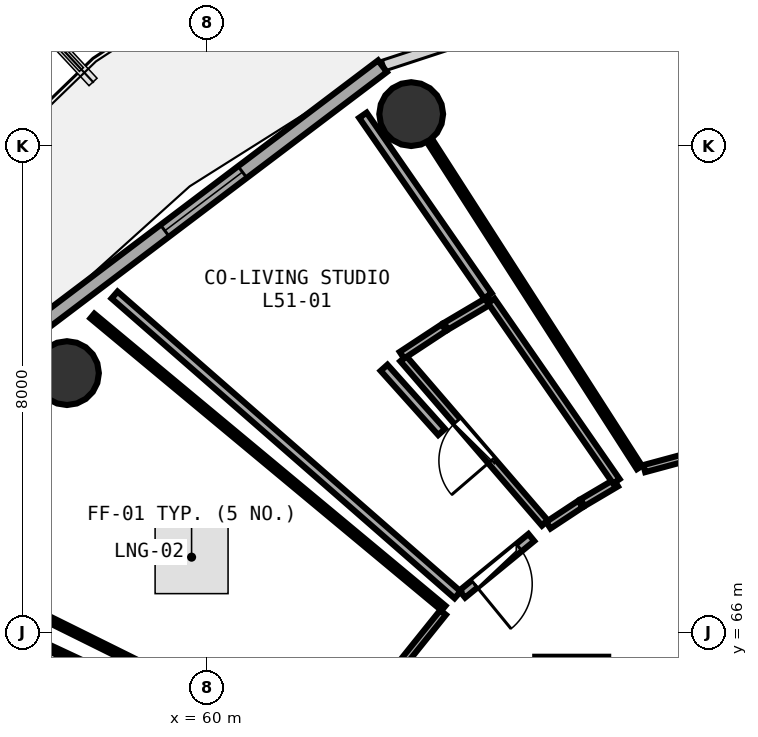
"""IFC4 building model, lengths in metres.
Left out: names, types, materials, properties, quantities, classifications, styles, units other than length and angle.
Written with IfcOpenShell. Run it as: python <this file> out.ifc"""

import sys

from ifc_helpers import new_model, si_unit, direction, frame, frame_2d, origin, origin_2d, place, context, subcontext, project, spatial, rectangle, circle, extrude, element, fill, save


model = new_model("IFC4")
c1 = context("Model", 3, precision=1e-05, world=origin(), true_north=direction((0.0, 1.0)))
c2 = subcontext(c1, "Body", "Model", "MODEL_VIEW")
j1 = project(units=[si_unit("LENGTHUNIT", "METRE"), si_unit("PLANEANGLEUNIT", "RADIAN")], contexts=[c1])
p1 = place(None, origin())
s1 = spatial("IfcSite", under=j1, at=p1, CompositionType="ELEMENT")
p2 = place(p1, origin())
s2 = spatial("IfcBuilding", under=s1, at=p2, CompositionType="ELEMENT")
p3 = place(p2, frame((0.0, 0.0, 200.7)))
s3 = spatial("IfcBuildingStorey", under=s2, at=p3, CompositionType="ELEMENT", Elevation=200.7)
p4 = place(p3, frame((66.0, 65.0, 0.0), z_axis=(0.0, 0.0, 1.0), x_axis=(1.0, 0.0, 0.0)))
e1 = element("IfcColumn", 1, at=p4, inside=s3, PredefinedType="PILASTER", context=c2, shape_type="SweptSolid", body=[
    extrude(rectangle(XDim=1.2, YDim=1.2, at=origin_2d()), origin(), (0.0, 0.0, 1.0), 3.75),
])
for number, where, z_axis, x_axis in (
    (2, (63.36, 74.524, 0.0), (0.0, 0.0, 1.0), (1.0, 0.0, 0.0)),
    (3, (57.698, 70.264, 0.0), (0.0, 0.0, 1.0), (1.0, 0.0, 0.0)),
):
    element("IfcColumn", number, at=place(p3, frame(where, z_axis=z_axis, x_axis=x_axis)), inside=s3, PredefinedType="COLUMN", context=c2, shape_type="SweptSolid", body=[
        extrude(circle(Radius=0.525, at=origin_2d()), origin(), (0.0, 0.0, 1.0), 3.75),
    ])
p5 = place(p3, frame((62.888, 75.312, 0.0), z_axis=(0.0, 0.0, 1.0), x_axis=(-0.797701674595, -0.603052268338, 0.0)))
e4 = element("IfcWall", 4, at=p5, inside=s3, PredefinedType="SOLIDWALL", context=c2, shape_type="SweptSolid", body=[
    extrude(rectangle(XDim=7.374, YDim=0.24, at=frame_2d((3.687, 0.0))), origin(), (0.0, 0.0, 1.0), 3.475),
])
p6 = place(p5, frame((2.887, 0.0, 0.85)))
e5 = element("IfcOpeningElement", 5, at=p6, cuts=e4, PredefinedType="OPENING", context=c2, shape_type="SweptSolid", body=[
    extrude(rectangle(XDim=1.6, YDim=1.45, at=frame_2d((0.8, 0.725))), frame((0.0, 0.13, 0.0), z_axis=(0.0, -1.0, 0.0), x_axis=(1.0, 0.0, 0.0)), (0.0, 0.0, 1.0), 0.26),
])
p7 = place(p3, frame((73.104, 70.291, 0.0), z_axis=(0.0, 0.0, 1.0), x_axis=(-0.965361221657, -0.260917059083, 0.0)))
e6 = element("IfcWall", 6, at=p7, inside=s3, PredefinedType="PARTITIONING", context=c2, shape_type="SweptSolid", body=[
    extrude(rectangle(XDim=6.123, YDim=0.12, at=frame_2d((3.062, 0.0))), origin(), (0.0, 0.0, 1.0), 3.025),
])
p8 = place(p7, frame((2.612, 0.0, 0.0)))
e7 = element("IfcOpeningElement", 7, at=p8, cuts=e6, PredefinedType="OPENING", context=c2, shape_type="SweptSolid", body=[
    extrude(rectangle(XDim=0.9, YDim=2.08, at=frame_2d((0.45, 1.04))), frame((0.0, 0.07, 0.0), z_axis=(0.0, -1.0, 0.0), x_axis=(1.0, 0.0, 0.0)), (0.0, 0.0, 1.0), 0.14),
])
p9 = place(p3, frame((65.56, 67.798, 0.0), z_axis=(0.0, 0.0, 1.0), x_axis=(-0.652591857515, 0.757709619515, 0.0)))
e8 = element("IfcWall", 8, at=p9, inside=s3, PredefinedType="PLUMBINGWALL", context=c2, shape_type="SweptSolid", body=[
    extrude(rectangle(XDim=3.57, YDim=0.13, at=frame_2d((1.785, 0.0))), origin(), (0.0, 0.0, 1.0), 3.025),
])
p10 = place(p9, frame((1.355, 0.0, 0.0)))
e9 = element("IfcOpeningElement", 9, at=p10, cuts=e8, PredefinedType="OPENING", context=c2, shape_type="SweptSolid", body=[
    extrude(rectangle(XDim=0.86, YDim=2.05, at=frame_2d((0.43, 1.025))), frame((0.0, 0.075, 0.0), z_axis=(0.0, -1.0, 0.0), x_axis=(1.0, 0.0, 0.0)), (0.0, 0.0, 1.0), 0.15),
])
p11 = place(p3, frame((65.336, 67.561, 0.0), z_axis=(0.0, 0.0, 1.0), x_axis=(-0.773453544763, -0.633852990917, 0.0)))
e10 = element("IfcWall", 10, at=p11, inside=s3, PredefinedType="PARTITIONING", context=c2, shape_type="SweptSolid", body=[
    extrude(rectangle(XDim=1.469, YDim=0.15, at=frame_2d((0.734, 0.0))), origin(), (0.0, 0.0, 1.0), 3.025),
])
p12 = place(p11, frame((0.259, 0.0, 0.0)))
e11 = element("IfcOpeningElement", 11, at=p12, cuts=e10, PredefinedType="OPENING", context=c2, shape_type="SweptSolid", body=[
    extrude(rectangle(XDim=0.95, YDim=2.08, at=frame_2d((0.475, 1.04))), frame((0.0, 0.085, 0.0), z_axis=(0.0, -1.0, 0.0), x_axis=(1.0, 0.0, 0.0)), (0.0, 0.0, 1.0), 0.17),
])
p13 = place(p3, frame((63.885, 66.327, 0.0), z_axis=(0.0, 0.0, 1.0), x_axis=(-0.626276824741, -0.779600756023, 0.0)))
e12 = element("IfcWall", 12, at=p13, inside=s3, PredefinedType="PARTITIONING", context=c2, shape_type="SweptSolid", body=[
    extrude(rectangle(XDim=2.99, YDim=0.12, at=frame_2d((1.495, 0.0))), origin(), (0.0, 0.0, 1.0), 3.025),
])
p14 = place(p13, frame((1.045, 0.0, 0.0)))
e13 = element("IfcOpeningElement", 13, at=p14, cuts=e12, PredefinedType="OPENING", context=c2, shape_type="SweptSolid", body=[
    extrude(rectangle(XDim=0.9, YDim=2.08, at=frame_2d((0.45, 1.04))), frame((0.0, 0.07, 0.0), z_axis=(0.0, -1.0, 0.0), x_axis=(1.0, 0.0, 0.0)), (0.0, 0.0, 1.0), 0.14),
])
p15 = place(p3, frame((67.113, 68.712, 0.0), z_axis=(0.0, 0.0, 1.0), x_axis=(-0.540224697902, 0.841520811256, 0.0)))
e14 = element("IfcWall", 14, at=p15, inside=s3, PredefinedType="PARTITIONING", context=c2, shape_type="SweptSolid", body=[
    extrude(rectangle(XDim=6.369, YDim=0.1, at=frame_2d((3.185, 0.0))), origin(), (0.0, 0.0, 1.0), 3.175),
])
p16 = place(p3, frame((66.728, 68.458, 0.0), z_axis=(0.0, 0.0, 1.0), x_axis=(-0.861116863464, -0.508407068655, 0.0)))
e15 = element("IfcWall", 15, at=p16, inside=s3, PredefinedType="PLUMBINGWALL", context=c2, shape_type="SweptSolid", body=[
    extrude(rectangle(XDim=0.638, YDim=0.13, at=frame_2d((0.319, 0.0))), origin(), (0.0, 0.0, 1.0), 3.48),
])
p17 = place(p3, frame((66.144, 68.112, 0.0), z_axis=(0.0, 0.0, 1.0), x_axis=(-0.834414447473, -0.551137487246, 0.0)))
e16 = element("IfcWall", 16, at=p17, inside=s3, PredefinedType="PLUMBINGWALL", context=c2, shape_type="SweptSolid", body=[
    extrude(rectangle(XDim=0.634, YDim=0.13, at=frame_2d((0.317, 0.0))), origin(), (0.0, 0.0, 1.0), 3.48),
])
p18 = place(p3, frame((63.208, 70.559, 0.0), z_axis=(0.0, 0.0, 1.0), x_axis=(0.835081531493, 0.550126199848, 0.0)))
e17 = element("IfcWall", 17, at=p18, inside=s3, PredefinedType="PLUMBINGWALL", context=c2, shape_type="SweptSolid", body=[
    extrude(rectangle(XDim=0.827, YDim=0.13, at=frame_2d((0.413, 0.0))), origin(), (0.0, 0.0, 1.0), 3.48),
])
p19 = place(p3, frame((63.932, 71.035, 0.0), z_axis=(0.0, 0.0, 1.0), x_axis=(0.860534659753, 0.509391891734, 0.0)))
e18 = element("IfcWall", 18, at=p19, inside=s3, PredefinedType="PLUMBINGWALL", context=c2, shape_type="SweptSolid", body=[
    extrude(rectangle(XDim=0.832, YDim=0.13, at=frame_2d((0.416, 0.0))), origin(), (0.0, 0.0, 1.0), 3.025),
])
p20 = place(p3, frame((64.677, 71.453, 0.0), z_axis=(0.0, 0.0, 1.0), x_axis=(0.569617686403, -0.821909782967, 0.0)))
e19 = element("IfcWall", 19, at=p20, inside=s3, PredefinedType="PLUMBINGWALL", context=c2, shape_type="SweptSolid", body=[
    extrude(rectangle(XDim=3.611, YDim=0.13, at=frame_2d((1.806, 0.0))), origin(), (0.0, 0.0, 1.0), 3.175),
])
p21 = place(p3, frame((64.123, 66.618, 0.0), z_axis=(0.0, 0.0, 1.0), x_axis=(-0.752988337425, 0.658033862124, 0.0)))
e20 = element("IfcWall", 20, at=p21, inside=s3, PredefinedType="PARTITIONING", context=c2, shape_type="SweptSolid", body=[
    extrude(rectangle(XDim=7.492, YDim=0.15, at=frame_2d((3.746, 0.0))), origin(), (0.0, 0.0, 1.0), 3.075),
])
p22 = place(p3, frame((62.566, 74.505, 0.0), z_axis=(0.0, 0.0, 1.0), x_axis=(0.569125600833, -0.822250600776, 0.0)))
e21 = element("IfcWall", 21, at=p22, inside=s3, PredefinedType="PARTITIONING", context=c2, shape_type="SweptSolid", body=[
    extrude(rectangle(XDim=3.611, YDim=0.15, at=frame_2d((1.806, 0.0))), origin(), (0.0, 0.0, 1.0), 3.025),
])
p23 = place(p3, frame((62.914, 70.352, 0.0), z_axis=(0.0, 0.0, 1.0), x_axis=(0.667393587085, -0.744705176508, 0.0)))
e22 = element("IfcWall", 22, at=p23, inside=s3, PredefinedType="PARTITIONING", context=c2, shape_type="SweptSolid", body=[
    extrude(rectangle(XDim=1.418, YDim=0.15, at=frame_2d((0.709, 0.0))), origin(), (0.0, 0.0, 1.0), 3.175),
])
p24 = place(p3, frame((61.938, 63.967, 0.0), z_axis=(0.0, 0.0, 1.0), x_axis=(-0.896052906747, 0.443947281003, 0.0)))
e23 = element("IfcWall", 23, at=p24, inside=s3, PredefinedType="PARTITIONING", context=c2, shape_type="SweptSolid", body=[
    extrude(rectangle(XDim=7.691, YDim=0.1, at=frame_2d((3.845, 0.0))), origin(), (0.0, 0.0, 1.0), 3.025),
])
p25 = place(p3, frame((58.117, 71.203, 0.0), z_axis=(0.0, 0.0, 1.0), x_axis=(0.768764498043, -0.63953197461, 0.0)))
e24 = element("IfcWall", 24, at=p25, inside=s3, PredefinedType="PARTITIONING", context=c2, shape_type="SweptSolid", body=[
    extrude(rectangle(XDim=7.511, YDim=0.1, at=frame_2d((3.756, 0.0))), origin(), (0.0, 0.0, 1.0), 3.025),
])
p26 = place(p3, frame((54.797, 66.963, 0.0), z_axis=(0.0, 0.0, 1.0), x_axis=(0.906002589331, -0.423272144283, 0.0)))
e25 = element("IfcWall", 25, at=p26, inside=s3, PredefinedType="PARTITIONING", context=c2, shape_type="SweptSolid", body=[
    extrude(rectangle(XDim=7.707, YDim=0.1, at=frame_2d((3.854, 0.0))), origin(), (0.0, 0.0, 1.0), 3.025),
])
p27 = place(p6, origin())
e26 = element("IfcWindow", 26, at=p27, inside=s3, PartitioningType="SINGLE_PANEL", PredefinedType="WINDOW", context=c2, shape_type="SweptSolid", body=[
    extrude(rectangle(XDim=1.6, YDim=1.45, at=frame_2d((0.8, 0.725))), frame((0.0, 0.03, 0.0), z_axis=(0.0, -1.0, 0.0), x_axis=(1.0, 0.0, 0.0)), (0.0, 0.0, 1.0), 0.06),
])
fill(e5, e26)
p28 = place(p10, origin())
e27 = element("IfcDoor", 27, at=p28, inside=s3, OperationType="SINGLE_SWING_LEFT", PredefinedType="DOOR", context=c2, shape_type="SweptSolid", body=[
    extrude(rectangle(XDim=0.86, YDim=2.05, at=frame_2d((0.43, 1.025))), frame((0.0, 0.025, 0.0), z_axis=(0.0, -1.0, 0.0), x_axis=(1.0, 0.0, 0.0)), (0.0, 0.0, 1.0), 0.05),
])
fill(e9, e27)
p29 = place(p12, origin())
e28 = element("IfcDoor", 28, at=p29, inside=s3, OperationType="SINGLE_SWING_RIGHT", PredefinedType="DOOR", context=c2, shape_type="SweptSolid", body=[
    extrude(rectangle(XDim=0.95, YDim=2.08, at=frame_2d((0.475, 1.04))), frame((0.0, 0.025, 0.0), z_axis=(0.0, -1.0, 0.0), x_axis=(1.0, 0.0, 0.0)), (0.0, 0.0, 1.0), 0.05),
])
fill(e11, e28)
save(model, sys.argv[1])
